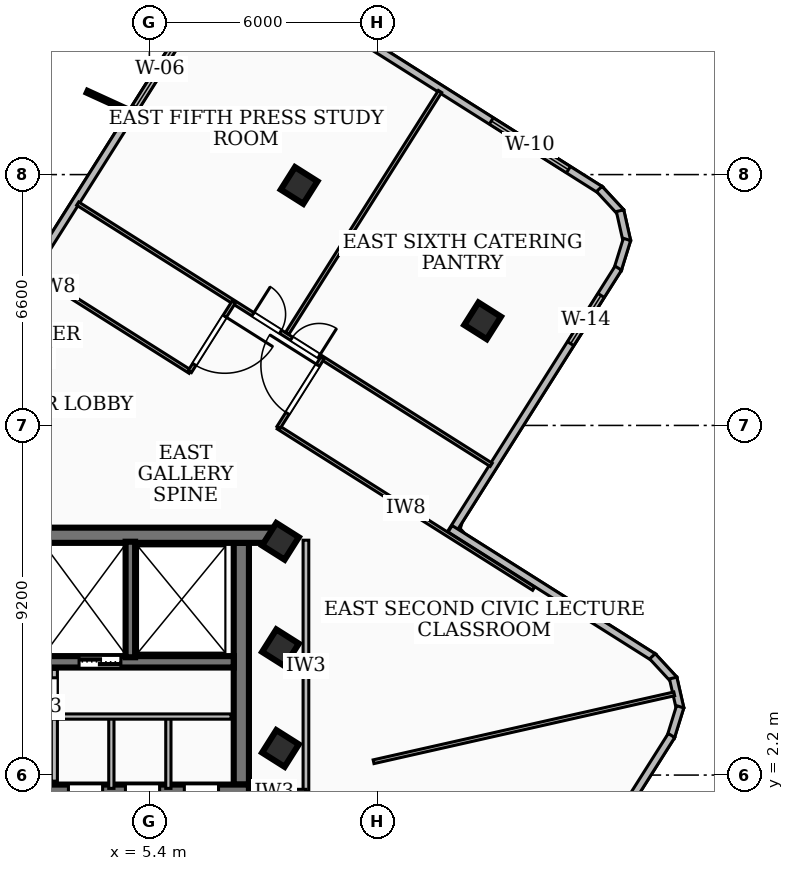
"""IFC4 building model, lengths in metres.
Left out: names, types, materials, properties, quantities, classifications, styles, units other than length and angle.
Written with IfcOpenShell. Run it as: python <this file> out.ifc"""

import sys

from ifc_helpers import new_model, si_unit, direction, frame, frame_2d, origin, origin_2d, place, context, subcontext, project, spatial, rectangle, extrude, element, fill, save


model = new_model("IFC4")
c1 = context("Model", 3, precision=1e-05, world=origin(), true_north=direction((0.0, 1.0)))
c2 = subcontext(c1, "Body", "Model", "MODEL_VIEW")
j1 = project(units=[si_unit("LENGTHUNIT", "METRE"), si_unit("PLANEANGLEUNIT", "RADIAN")], contexts=[c1])
p1 = place(None, origin())
s1 = spatial("IfcSite", under=j1, at=p1, CompositionType="ELEMENT")
p2 = place(p1, origin())
s2 = spatial("IfcBuilding", under=s1, at=p2, CompositionType="ELEMENT")
p3 = place(p2, frame((0.0, 0.0, 271.44)))
s3 = spatial("IfcBuildingStorey", under=s2, at=p3, CompositionType="ELEMENT", Elevation=271.44)
p4 = place(p3, frame((-8.78, 8.51, 0.0), z_axis=(0.0, 0.0, 1.0), x_axis=(1.0, 0.0, 0.0)))
e1 = element("IfcWall", 1, at=p4, inside=s3, PredefinedType="SHEAR", context=c2, shape_type="SweptSolid", body=[
    extrude(rectangle(XDim=17.56, YDim=0.4, at=frame_2d((8.78, 0.0))), origin(), (0.0, 0.0, 1.0), 3.16),
])
p5 = place(p3, frame((8.02, 1.75, 0.0), z_axis=(0.0, 0.0, 1.0), x_axis=(-1.0, 0.0, 0.0)))
e2 = element("IfcWall", 2, at=p5, inside=s3, PredefinedType="SHEAR", context=c2, shape_type="SweptSolid", body=[
    extrude(rectangle(XDim=16.04, YDim=0.4, at=frame_2d((8.02, 0.0))), origin(), (0.0, 0.0, 1.0), 3.16),
])
p6 = place(p5, frame((7.45, 0.0, 0.0)))
e3 = element("IfcOpeningElement", 3, at=p6, cuts=e2, PredefinedType="OPENING", context=c2, shape_type="SweptSolid", body=[
    extrude(rectangle(XDim=1.0, YDim=2.1, at=frame_2d((0.5, 1.05))), frame((0.0, 0.21, 0.0), z_axis=(0.0, -1.0, 0.0), x_axis=(1.0, 0.0, 0.0)), (0.0, 0.0, 1.0), 0.42),
])
p7 = place(p5, frame((14.285, 0.0, 0.0)))
e4 = element("IfcOpeningElement", 4, at=p7, cuts=e2, PredefinedType="OPENING", context=c2, shape_type="SweptSolid", body=[
    extrude(rectangle(XDim=1.05, YDim=2.15, at=frame_2d((0.525, 1.075))), frame((0.0, 0.21, 0.0), z_axis=(0.0, -1.0, 0.0), x_axis=(1.0, 0.0, 0.0)), (0.0, 0.0, 1.0), 0.42),
])
p8 = place(p5, frame((12.725, 0.0, 0.0)))
e5 = element("IfcOpeningElement", 5, at=p8, cuts=e2, PredefinedType="OPENING", context=c2, shape_type="SweptSolid", body=[
    extrude(rectangle(XDim=1.05, YDim=2.15, at=frame_2d((0.525, 1.075))), frame((0.0, 0.21, 0.0), z_axis=(0.0, -1.0, 0.0), x_axis=(1.0, 0.0, 0.0)), (0.0, 0.0, 1.0), 0.42),
])
p9 = place(p5, frame((11.165, 0.0, 0.0)))
e6 = element("IfcOpeningElement", 6, at=p9, cuts=e2, PredefinedType="OPENING", context=c2, shape_type="SweptSolid", body=[
    extrude(rectangle(XDim=1.05, YDim=2.15, at=frame_2d((0.525, 1.075))), frame((0.0, 0.21, 0.0), z_axis=(0.0, -1.0, 0.0), x_axis=(1.0, 0.0, 0.0)), (0.0, 0.0, 1.0), 0.42),
])
p10 = place(p5, frame((3.85, 0.0, 0.0)))
e7 = element("IfcOpeningElement", 7, at=p10, cuts=e2, PredefinedType="OPENING", context=c2, shape_type="SweptSolid", body=[
    extrude(rectangle(XDim=0.9, YDim=2.06, at=frame_2d((0.45, 1.03))), frame((0.0, 0.21, 0.0), z_axis=(0.0, -1.0, 0.0), x_axis=(1.0, 0.0, 0.0)), (0.0, 0.0, 1.0), 0.42),
])
p11 = place(p5, frame((2.35, 0.0, 0.0)))
e8 = element("IfcOpeningElement", 8, at=p11, cuts=e2, PredefinedType="OPENING", context=c2, shape_type="SweptSolid", body=[
    extrude(rectangle(XDim=0.9, YDim=2.06, at=frame_2d((0.45, 1.03))), frame((0.0, 0.21, 0.0), z_axis=(0.0, -1.0, 0.0), x_axis=(1.0, 0.0, 0.0)), (0.0, 0.0, 1.0), 0.42),
])
p12 = place(p5, frame((0.8, 0.0, 0.0)))
e9 = element("IfcOpeningElement", 9, at=p12, cuts=e2, PredefinedType="OPENING", context=c2, shape_type="SweptSolid", body=[
    extrude(rectangle(XDim=0.9, YDim=2.06, at=frame_2d((0.45, 1.03))), frame((0.0, 0.21, 0.0), z_axis=(0.0, -1.0, 0.0), x_axis=(1.0, 0.0, 0.0)), (0.0, 0.0, 1.0), 0.42),
])
p13 = place(p3, frame((7.82, 8.31, 0.0), z_axis=(0.0, 0.0, 1.0), x_axis=(0.0, -1.0, 0.0)))
e10 = element("IfcWall", 10, at=p13, inside=s3, PredefinedType="SHEAR", context=c2, shape_type="SweptSolid", body=[
    extrude(rectangle(XDim=6.36, YDim=0.4, at=frame_2d((3.18, 0.0))), origin(), (0.0, 0.0, 1.0), 3.16),
])
p14 = place(p3, frame((7.62, 5.18, 0.0), z_axis=(0.0, 0.0, 1.0), x_axis=(-1.0, 0.0, 0.0)))
e11 = element("IfcWall", 11, at=p14, inside=s3, PredefinedType="SOLIDWALL", context=c2, shape_type="SweptSolid", body=[
    extrude(rectangle(XDim=15.24, YDim=0.3, at=frame_2d((7.62, 0.0))), origin(), (0.0, 0.0, 1.0), 3.16),
])
p15 = place(p14, frame((5.77, 0.0, 0.0)))
e12 = element("IfcOpeningElement", 12, at=p15, cuts=e11, PredefinedType="OPENING", context=c2, shape_type="SweptSolid", body=[
    extrude(rectangle(XDim=1.1, YDim=2.15, at=frame_2d((0.55, 1.075))), frame((0.0, 0.16, 0.0), z_axis=(0.0, -1.0, 0.0), x_axis=(1.0, 0.0, 0.0)), (0.0, 0.0, 1.0), 0.32),
])
p16 = place(p14, frame((2.97, 0.0, 0.0)))
e13 = element("IfcOpeningElement", 13, at=p16, cuts=e11, PredefinedType="OPENING", context=c2, shape_type="SweptSolid", body=[
    extrude(rectangle(XDim=1.1, YDim=2.15, at=frame_2d((0.55, 1.075))), frame((0.0, 0.16, 0.0), z_axis=(0.0, -1.0, 0.0), x_axis=(1.0, 0.0, 0.0)), (0.0, 0.0, 1.0), 0.32),
])
p17 = place(p14, frame((7.97, 0.0, 0.0)))
e14 = element("IfcOpeningElement", 14, at=p17, cuts=e11, PredefinedType="OPENING", context=c2, shape_type="SweptSolid", body=[
    extrude(rectangle(XDim=1.0, YDim=2.1, at=frame_2d((0.5, 1.05))), frame((0.0, 0.16, 0.0), z_axis=(0.0, -1.0, 0.0), x_axis=(1.0, 0.0, 0.0)), (0.0, 0.0, 1.0), 0.32),
])
p18 = place(p3, frame((4.9, 5.3, 0.0), z_axis=(0.0, 0.0, 1.0), x_axis=(0.0, 1.0, 0.0)))
e15 = element("IfcWall", 15, at=p18, inside=s3, PredefinedType="SOLIDWALL", context=c2, shape_type="SweptSolid", body=[
    extrude(rectangle(XDim=3.04, YDim=0.25, at=frame_2d((1.52, 0.0))), origin(), (0.0, 0.0, 1.0), 3.16),
])
for number, where, z_axis, x_axis in (
    (16, (8.85, 2.9, 0.0), (0.0, 0.0, 1.0), (0.534, 0.845, 0.0)),
    (17, (8.85, 5.55, 0.0), (0.0, 0.0, 1.0), (0.534, 0.845, 0.0)),
    (18, (8.85, 8.35, 0.0), (0.0, 0.0, 1.0), (0.534, 0.845, 0.0)),
    (19, (14.169, 14.152, 0.0), (0.0, 0.0, 1.0), (0.534, 0.845, 0.0)),
    (20, (9.341, 17.714, 0.0), (0.0, 0.0, 1.0), (0.534, 0.845, 0.0)),
):
    element("IfcColumn", number, at=place(p3, frame(where, z_axis=z_axis, x_axis=x_axis)), inside=s3, PredefinedType="COLUMN", context=c2, shape_type="SweptSolid", body=[
        extrude(rectangle(XDim=0.7, YDim=0.7, at=origin_2d()), origin(), (0.0, 0.0, 1.0), 3.42),
    ])
p19 = place(p3, frame((2.348, 15.513, 0.0), z_axis=(0.0, 0.0, 1.0), x_axis=(0.533962901644, 0.845507906331, 0.0)))
e21 = element("IfcWall", 21, at=p19, inside=s3, PredefinedType="SOLIDWALL", context=c2, shape_type="SweptSolid", body=[
    extrude(rectangle(XDim=8.242, YDim=0.2, at=frame_2d((4.121, 0.0))), origin(), (0.0, 0.0, 1.0), 3.16),
])
p20 = place(p19, frame((5.042, 0.0, 0.85)))
e22 = element("IfcOpeningElement", 22, at=p20, cuts=e21, PredefinedType="OPENING", context=c2, shape_type="SweptSolid", body=[
    extrude(rectangle(XDim=2.4, YDim=1.85, at=frame_2d((1.2, 0.925))), frame((0.0, 0.11, 0.0), z_axis=(0.0, -1.0, 0.0), x_axis=(1.0, 0.0, 0.0)), (0.0, 0.0, 1.0), 0.22),
])
p21 = place(p3, frame((8.803, 22.945, 0.0), z_axis=(0.0, 0.0, 1.0), x_axis=(0.845446069837, -0.534060804588, 0.0)))
e23 = element("IfcWall", 23, at=p21, inside=s3, PredefinedType="SOLIDWALL", context=c2, shape_type="SweptSolid", body=[
    extrude(rectangle(XDim=10.023, YDim=0.2, at=frame_2d((5.012, 0.0))), origin(), (0.0, 0.0, 1.0), 3.16),
])
p22 = place(p21, frame((6.618, 0.0, 0.85)))
e24 = element("IfcOpeningElement", 24, at=p22, cuts=e23, PredefinedType="OPENING", context=c2, shape_type="SweptSolid", body=[
    extrude(rectangle(XDim=2.4, YDim=1.65, at=frame_2d((1.2, 0.825))), frame((0.0, 0.11, 0.0), z_axis=(0.0, -1.0, 0.0), x_axis=(1.0, 0.0, 0.0)), (0.0, 0.0, 1.0), 0.22),
])
p23 = place(p3, frame((17.239, 17.623, 0.0), z_axis=(0.0, 0.0, 1.0), x_axis=(0.679187212508, -0.73396507435, 0.0)))
e25 = element("IfcWall", 25, at=p23, inside=s3, PredefinedType="SOLIDWALL", context=c2, shape_type="SweptSolid", body=[
    extrude(rectangle(XDim=0.838, YDim=0.2, at=frame_2d((0.419, 0.0))), origin(), (0.0, 0.0, 1.0), 3.16),
])
p24 = place(p3, frame((17.786, 17.05, 0.0), z_axis=(0.0, 0.0, 1.0), x_axis=(0.21868713362, -0.975795028471, 0.0)))
e26 = element("IfcWall", 26, at=p24, inside=s3, PredefinedType="SOLIDWALL", context=c2, shape_type="SweptSolid", body=[
    extrude(rectangle(XDim=0.824, YDim=0.2, at=frame_2d((0.412, 0.0))), origin(), (0.0, 0.0, 1.0), 3.16),
])
p25 = place(p3, frame((17.968, 16.294, 0.0), z_axis=(0.0, 0.0, 1.0), x_axis=(-0.296133339917, -0.95514660916, 0.0)))
e27 = element("IfcWall", 27, at=p25, inside=s3, PredefinedType="SOLIDWALL", context=c2, shape_type="SweptSolid", body=[
    extrude(rectangle(XDim=0.838, YDim=0.2, at=frame_2d((0.419, 0.0))), origin(), (0.0, 0.0, 1.0), 3.16),
])
p26 = place(p3, frame((17.74, 15.539, 0.0), z_axis=(0.0, 0.0, 1.0), x_axis=(-0.533941726163, -0.845521278893, 0.0)))
e28 = element("IfcWall", 28, at=p26, inside=s3, PredefinedType="SOLIDWALL", context=c2, shape_type="SweptSolid", body=[
    extrude(rectangle(XDim=8.242, YDim=0.2, at=frame_2d((4.121, 0.0))), origin(), (0.0, 0.0, 1.0), 3.16),
])
p27 = place(p26, frame((0.85, 0.0, 0.85)))
e29 = element("IfcOpeningElement", 29, at=p27, cuts=e28, PredefinedType="OPENING", context=c2, shape_type="SweptSolid", body=[
    extrude(rectangle(XDim=1.5, YDim=1.5, at=frame_2d((0.75, 0.75))), frame((0.0, 0.11, 0.0), z_axis=(0.0, -1.0, 0.0), x_axis=(1.0, 0.0, 0.0)), (0.0, 0.0, 1.0), 0.22),
])
p28 = place(p3, frame((13.314, 8.681, 0.0), z_axis=(0.0, 0.0, 1.0), x_axis=(0.845530066623, -0.533927810135, 0.0)))
e30 = element("IfcWall", 30, at=p28, inside=s3, PredefinedType="SOLIDWALL", context=c2, shape_type="SweptSolid", body=[
    extrude(rectangle(XDim=6.342, YDim=0.2, at=frame_2d((3.171, 0.0))), origin(), (0.0, 0.0, 1.0), 3.16),
])
p29 = place(p3, frame((18.638, 5.326, 0.0), z_axis=(0.0, 0.0, 1.0), x_axis=(0.678558613405, -0.734546260064, 0.0)))
e31 = element("IfcWall", 31, at=p29, inside=s3, PredefinedType="SOLIDWALL", context=c2, shape_type="SweptSolid", body=[
    extrude(rectangle(XDim=0.837, YDim=0.2, at=frame_2d((0.418, 0.0))), origin(), (0.0, 0.0, 1.0), 3.16),
])
p30 = place(p3, frame((19.183, 4.753, 0.0), z_axis=(0.0, 0.0, 1.0), x_axis=(0.22178748126, -0.975095027757, 0.0)))
e32 = element("IfcWall", 32, at=p30, inside=s3, PredefinedType="SOLIDWALL", context=c2, shape_type="SweptSolid", body=[
    extrude(rectangle(XDim=0.824, YDim=0.2, at=frame_2d((0.412, 0.0))), origin(), (0.0, 0.0, 1.0), 3.16),
])
p31 = place(p3, frame((19.367, 3.997, 0.0), z_axis=(0.0, 0.0, 1.0), x_axis=(-0.295803919306, -0.955248680357, 0.0)))
e33 = element("IfcWall", 33, at=p31, inside=s3, PredefinedType="SOLIDWALL", context=c2, shape_type="SweptSolid", body=[
    extrude(rectangle(XDim=0.839, YDim=0.2, at=frame_2d((0.419, 0.0))), origin(), (0.0, 0.0, 1.0), 3.16),
])
p32 = place(p3, frame((19.139, 3.241, 0.0), z_axis=(0.0, 0.0, 1.0), x_axis=(-0.534084270085, -0.845431246435, 0.0)))
e34 = element("IfcWall", 34, at=p32, inside=s3, PredefinedType="SOLIDWALL", context=c2, shape_type="SweptSolid", body=[
    extrude(rectangle(XDim=6.742, YDim=0.2, at=frame_2d((3.371, 0.0))), origin(), (0.0, 0.0, 1.0), 3.16),
])
p33 = place(p3, frame((2.9, 2.04, 0.0), z_axis=(0.0, 0.0, 1.0), x_axis=(0.0, 1.0, 0.0)))
e35 = element("IfcWall", 35, at=p33, inside=s3, PredefinedType="PARTITIONING", context=c2, shape_type="SweptSolid", body=[
    extrude(rectangle(XDim=2.94, YDim=0.16, at=frame_2d((1.47, 0.0))), origin(), (0.0, 0.0, 1.0), 2.39),
])
p34 = place(p33, frame((1.82, 0.0, 0.0)))
e36 = element("IfcOpeningElement", 36, at=p34, cuts=e35, PredefinedType="OPENING", context=c2, shape_type="SweptSolid", body=[
    extrude(rectangle(XDim=0.9, YDim=2.06, at=frame_2d((0.45, 1.03))), frame((0.0, 0.09, 0.0), z_axis=(0.0, -1.0, 0.0), x_axis=(1.0, 0.0, 0.0)), (0.0, 0.0, 1.0), 0.18),
])
p35 = place(p3, frame((2.9, 3.74, 0.0), z_axis=(0.0, 0.0, 1.0), x_axis=(1.0, 0.0, 0.0)))
e37 = element("IfcWall", 37, at=p35, inside=s3, PredefinedType="PARTITIONING", context=c2, shape_type="SweptSolid", body=[
    extrude(rectangle(XDim=4.65, YDim=0.138, at=frame_2d((2.325, 0.0))), origin(), (0.0, 0.0, 1.0), 3.16),
])
for number, where, z_axis, x_axis in (
    (38, (4.4, 1.85, 0.0), (0.0, 0.0, 1.0), (0.0, 1.0, 0.0)),
    (39, (5.9, 1.85, 0.0), (0.0, 0.0, 1.0), (0.0, 1.0, 0.0)),
):
    element("IfcWall", number, at=place(p3, frame(where, z_axis=z_axis, x_axis=x_axis)), inside=s3, PredefinedType="PARTITIONING", context=c2, shape_type="SweptSolid", body=[
        extrude(rectangle(XDim=1.89, YDim=0.138, at=frame_2d((0.945, 0.0))), origin(), (0.0, 0.0, 1.0), 2.39),
    ])
p36 = place(p3, frame((9.52, 1.75, 0.0), z_axis=(0.0, 0.0, 1.0), x_axis=(0.0, 1.0, 0.0)))
e40 = element("IfcWall", 40, at=p36, inside=s3, PredefinedType="PARTITIONING", context=c2, shape_type="SweptSolid", body=[
    extrude(rectangle(XDim=6.63, YDim=0.15, at=frame_2d((3.315, 0.0))), origin(), (0.0, 0.0, 1.0), 3.16),
])
p37 = place(p3, frame((7.85, 1.75, 0.0), z_axis=(0.0, 0.0, 1.0), x_axis=(1.0, 0.0, 0.0)))
e41 = element("IfcWall", 41, at=p37, inside=s3, PredefinedType="PARTITIONING", context=c2, shape_type="SweptSolid", body=[
    extrude(rectangle(XDim=1.67, YDim=0.15, at=frame_2d((0.835, 0.0))), origin(), (0.0, 0.0, 1.0), 2.39),
])
p38 = place(p3, frame((11.3, 2.551, 0.0), z_axis=(0.0, 0.0, 1.0), x_axis=(0.975452684537, 0.220209128395, 0.0)))
e42 = element("IfcWall", 42, at=p38, inside=s3, PredefinedType="PARTITIONING", context=c2, shape_type="SweptSolid", body=[
    extrude(rectangle(XDim=8.11, YDim=0.1, at=frame_2d((4.055, 0.0))), origin(), (0.0, 0.0, 1.0), 3.16),
])
p39 = place(p3, frame((6.473, 12.813, 0.0), z_axis=(0.0, 0.0, 1.0), x_axis=(-0.845447210208, 0.534058999317, 0.0)))
e43 = element("IfcWall", 43, at=p39, inside=s3, PredefinedType="PARTITIONING", context=c2, shape_type="SweptSolid", body=[
    extrude(rectangle(XDim=8.349, YDim=0.1, at=frame_2d((4.175, 0.0))), origin(), (0.0, 0.0, 1.0), 3.16),
])
p40 = place(p3, frame((15.512, 7.104, 0.0), z_axis=(0.0, 0.0, 1.0), x_axis=(-0.845450958208, 0.534053065963, 0.0)))
e44 = element("IfcWall", 44, at=p40, inside=s3, PredefinedType="PARTITIONING", context=c2, shape_type="SweptSolid", body=[
    extrude(rectangle(XDim=7.951, YDim=0.1, at=frame_2d((3.975, 0.0))), origin(), (0.0, 0.0, 1.0), 2.53),
])
p41 = place(p3, frame((7.619, 14.645, 0.0), z_axis=(0.0, 0.0, 1.0), x_axis=(-0.533984489243, -0.845494272747, 0.0)))
e45 = element("IfcWall", 45, at=p41, inside=s3, PredefinedType="PARTITIONING", context=c2, shape_type="SweptSolid", body=[
    extrude(rectangle(XDim=2.161, YDim=0.1, at=frame_2d((1.08, 0.0))), origin(), (0.0, 0.0, 1.0), 3.16),
])
p42 = place(p41, frame((0.441, 0.0, 0.0)))
e46 = element("IfcOpeningElement", 46, at=p42, cuts=e45, PredefinedType="OPENING", context=c2, shape_type="SweptSolid", body=[
    extrude(rectangle(XDim=1.5, YDim=2.12, at=frame_2d((0.75, 1.06))), frame((0.0, 0.06, 0.0), z_axis=(0.0, -1.0, 0.0), x_axis=(1.0, 0.0, 0.0)), (0.0, 0.0, 1.0), 0.12),
])
p43 = place(p3, frame((8.798, 11.344, 0.0), z_axis=(0.0, 0.0, 1.0), x_axis=(0.533984489243, 0.845494272747, 0.0)))
e47 = element("IfcWall", 47, at=p43, inside=s3, PredefinedType="PARTITIONING", context=c2, shape_type="SweptSolid", body=[
    extrude(rectangle(XDim=2.161, YDim=0.1, at=frame_2d((1.08, 0.0))), origin(), (0.0, 0.0, 1.0), 2.53),
])
p44 = place(p43, frame((0.441, 0.0, 0.0)))
e48 = element("IfcOpeningElement", 48, at=p44, cuts=e47, PredefinedType="OPENING", context=c2, shape_type="SweptSolid", body=[
    extrude(rectangle(XDim=1.5, YDim=2.12, at=frame_2d((0.75, 1.06))), frame((0.0, 0.06, 0.0), z_axis=(0.0, -1.0, 0.0), x_axis=(1.0, 0.0, 0.0)), (0.0, 0.0, 1.0), 0.12),
])
p45 = place(p3, frame((9.029, 13.825, 0.0), z_axis=(0.0, 0.0, 1.0), x_axis=(0.534078432884, 0.845434933941, 0.0)))
e49 = element("IfcWall", 49, at=p45, inside=s3, PredefinedType="PARTITIONING", context=c2, shape_type="SweptSolid", body=[
    extrude(rectangle(XDim=7.525, YDim=0.1, at=frame_2d((3.763, 0.0))), origin(), (0.0, 0.0, 1.0), 2.53),
])
p46 = place(p3, frame((3.514, 17.237, 0.0), z_axis=(0.0, 0.0, 1.0), x_axis=(0.845461855996, -0.534035813458, 0.0)))
e50 = element("IfcWall", 50, at=p46, inside=s3, PredefinedType="PARTITIONING", context=c2, shape_type="SweptSolid", body=[
    extrude(rectangle(XDim=12.87, YDim=0.1, at=frame_2d((6.435, 0.0))), origin(), (0.0, 0.0, 1.0), 2.53),
])
p47 = place(p46, frame((6.655, 0.0, 0.0)))
e51 = element("IfcOpeningElement", 51, at=p47, cuts=e50, PredefinedType="OPENING", context=c2, shape_type="SweptSolid", body=[
    extrude(rectangle(XDim=0.86, YDim=2.04, at=frame_2d((0.43, 1.02))), frame((0.0, 0.06, 0.0), z_axis=(0.0, -1.0, 0.0), x_axis=(1.0, 0.0, 0.0)), (0.0, 0.0, 1.0), 0.12),
])
p48 = place(p46, frame((5.454, 0.0, 0.0)))
e52 = element("IfcOpeningElement", 52, at=p48, cuts=e50, PredefinedType="OPENING", context=c2, shape_type="SweptSolid", body=[
    extrude(rectangle(XDim=0.86, YDim=2.04, at=frame_2d((0.43, 1.02))), frame((0.0, 0.06, 0.0), z_axis=(0.0, -1.0, 0.0), x_axis=(1.0, 0.0, 0.0)), (0.0, 0.0, 1.0), 0.12),
])
p49 = place(p20, origin())
e53 = element("IfcWindow", 53, at=p49, inside=s3, PartitioningType="SINGLE_PANEL", PredefinedType="WINDOW", context=c2, shape_type="SweptSolid", body=[
    extrude(rectangle(XDim=2.4, YDim=1.85, at=frame_2d((1.2, 0.925))), frame((0.0, 0.03, 0.0), z_axis=(0.0, -1.0, 0.0), x_axis=(1.0, 0.0, 0.0)), (0.0, 0.0, 1.0), 0.06),
])
fill(e22, e53)
p50 = place(p22, origin())
e54 = element("IfcWindow", 54, at=p50, inside=s3, PartitioningType="SINGLE_PANEL", PredefinedType="WINDOW", context=c2, shape_type="SweptSolid", body=[
    extrude(rectangle(XDim=2.4, YDim=1.65, at=frame_2d((1.2, 0.825))), frame((0.0, 0.03, 0.0), z_axis=(0.0, -1.0, 0.0), x_axis=(1.0, 0.0, 0.0)), (0.0, 0.0, 1.0), 0.06),
])
fill(e24, e54)
p51 = place(p27, origin())
e55 = element("IfcWindow", 55, at=p51, inside=s3, PartitioningType="SINGLE_PANEL", PredefinedType="WINDOW", context=c2, shape_type="SweptSolid", body=[
    extrude(rectangle(XDim=1.5, YDim=1.5, at=frame_2d((0.75, 0.75))), frame((0.0, 0.03, 0.0), z_axis=(0.0, -1.0, 0.0), x_axis=(1.0, 0.0, 0.0)), (0.0, 0.0, 1.0), 0.06),
])
fill(e29, e55)
p52 = place(p16, origin())
e56 = element("IfcDoor", 56, at=p52, inside=s3, OperationType="DOUBLE_DOOR_SLIDING", PredefinedType="DOOR", context=c2, shape_type="SweptSolid", body=[
    extrude(rectangle(XDim=1.1, YDim=2.15, at=frame_2d((0.55, 1.075))), frame((0.0, 0.025, 0.0), z_axis=(0.0, -1.0, 0.0), x_axis=(1.0, 0.0, 0.0)), (0.0, 0.0, 1.0), 0.05),
])
fill(e13, e56)
p53 = place(p10, origin())
e57 = element("IfcDoor", 57, at=p53, inside=s3, OperationType="SINGLE_SWING_RIGHT", PredefinedType="DOOR", context=c2, shape_type="SweptSolid", body=[
    extrude(rectangle(XDim=0.9, YDim=2.06, at=frame_2d((0.45, 1.03))), frame((0.0, 0.025, 0.0), z_axis=(0.0, -1.0, 0.0), x_axis=(1.0, 0.0, 0.0)), (0.0, 0.0, 1.0), 0.05),
])
fill(e7, e57)
p54 = place(p11, origin())
e58 = element("IfcDoor", 58, at=p54, inside=s3, OperationType="SINGLE_SWING_LEFT", PredefinedType="DOOR", context=c2, shape_type="SweptSolid", body=[
    extrude(rectangle(XDim=0.9, YDim=2.06, at=frame_2d((0.45, 1.03))), frame((0.0, 0.025, 0.0), z_axis=(0.0, -1.0, 0.0), x_axis=(1.0, 0.0, 0.0)), (0.0, 0.0, 1.0), 0.05),
])
fill(e8, e58)
p55 = place(p12, origin())
e59 = element("IfcDoor", 59, at=p55, inside=s3, OperationType="SINGLE_SWING_LEFT", PredefinedType="DOOR", context=c2, shape_type="SweptSolid", body=[
    extrude(rectangle(XDim=0.9, YDim=2.06, at=frame_2d((0.45, 1.03))), frame((0.0, 0.025, 0.0), z_axis=(0.0, -1.0, 0.0), x_axis=(1.0, 0.0, 0.0)), (0.0, 0.0, 1.0), 0.05),
])
fill(e9, e59)
p56 = place(p34, origin())
e60 = element("IfcDoor", 60, at=p56, inside=s3, OperationType="SINGLE_SWING_LEFT", PredefinedType="DOOR", context=c2, shape_type="SweptSolid", body=[
    extrude(rectangle(XDim=0.9, YDim=2.06, at=frame_2d((0.45, 1.03))), frame((0.0, 0.025, 0.0), z_axis=(0.0, -1.0, 0.0), x_axis=(1.0, 0.0, 0.0)), (0.0, 0.0, 1.0), 0.05),
])
fill(e36, e60)
p57 = place(p42, origin())
e61 = element("IfcDoor", 61, at=p57, inside=s3, OperationType="SINGLE_SWING_LEFT", PredefinedType="DOOR", context=c2, shape_type="SweptSolid", body=[
    extrude(rectangle(XDim=1.5, YDim=2.12, at=frame_2d((0.75, 1.06))), frame((0.0, 0.025, 0.0), z_axis=(0.0, -1.0, 0.0), x_axis=(1.0, 0.0, 0.0)), (0.0, 0.0, 1.0), 0.05),
])
fill(e46, e61)
p58 = place(p44, origin())
e62 = element("IfcDoor", 62, at=p58, inside=s3, OperationType="SINGLE_SWING_RIGHT", PredefinedType="DOOR", context=c2, shape_type="SweptSolid", body=[
    extrude(rectangle(XDim=1.5, YDim=2.12, at=frame_2d((0.75, 1.06))), frame((0.0, 0.025, 0.0), z_axis=(0.0, -1.0, 0.0), x_axis=(1.0, 0.0, 0.0)), (0.0, 0.0, 1.0), 0.05),
])
fill(e48, e62)
p59 = place(p47, origin())
e63 = element("IfcDoor", 63, at=p59, inside=s3, OperationType="SINGLE_SWING_RIGHT", PredefinedType="DOOR", context=c2, shape_type="SweptSolid", body=[
    extrude(rectangle(XDim=0.86, YDim=2.04, at=frame_2d((0.43, 1.02))), frame((0.0, 0.025, 0.0), z_axis=(0.0, -1.0, 0.0), x_axis=(1.0, 0.0, 0.0)), (0.0, 0.0, 1.0), 0.05),
])
fill(e51, e63)
p60 = place(p48, origin())
e64 = element("IfcDoor", 64, at=p60, inside=s3, OperationType="SINGLE_SWING_LEFT", PredefinedType="DOOR", context=c2, shape_type="SweptSolid", body=[
    extrude(rectangle(XDim=0.86, YDim=2.04, at=frame_2d((0.43, 1.02))), frame((0.0, 0.025, 0.0), z_axis=(0.0, -1.0, 0.0), x_axis=(1.0, 0.0, 0.0)), (0.0, 0.0, 1.0), 0.05),
])
fill(e52, e64)
save(model, sys.argv[1])
